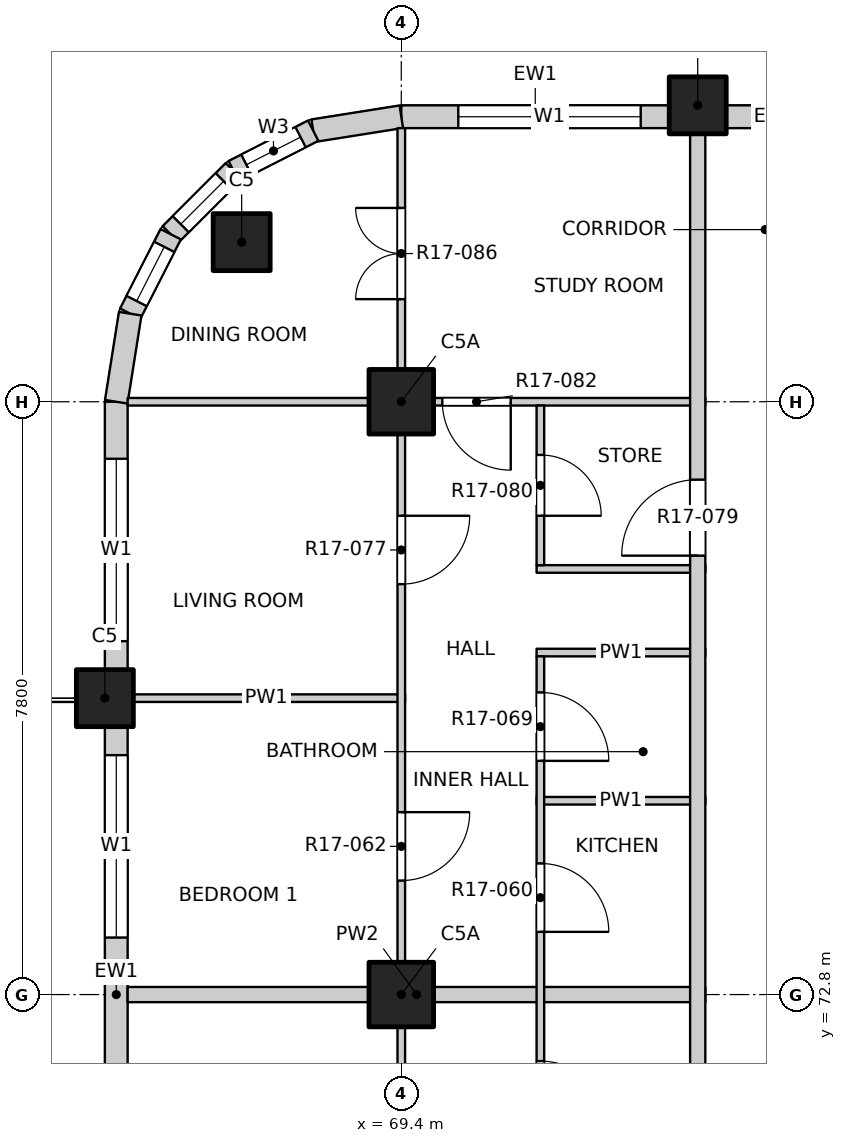
"""IFC4 building model, lengths in metres.
Left out: names, types, materials, properties, quantities, classifications, styles, units other than length and angle.
Written with IfcOpenShell. Run it as: python <this file> out.ifc"""

import sys

from ifc_helpers import new_model, si_unit, direction, frame, frame_2d, origin, origin_2d, place, context, subcontext, project, spatial, rectangle, extrude, element, fill, save


model = new_model("IFC4")
c1 = context("Model", 3, precision=1e-05, world=origin(), true_north=direction((0.0, 1.0)))
c2 = subcontext(c1, "Body", "Model", "MODEL_VIEW")
j1 = project(units=[si_unit("LENGTHUNIT", "METRE"), si_unit("PLANEANGLEUNIT", "RADIAN")], contexts=[c1])
p1 = place(None, origin())
s1 = spatial("IfcSite", under=j1, at=p1, CompositionType="ELEMENT")
p2 = place(p1, origin())
s2 = spatial("IfcBuilding", under=s1, at=p2, CompositionType="ELEMENT")
p3 = place(p2, frame((0.0, 0.0, 179.2)))
s3 = spatial("IfcBuildingStorey", under=s2, at=p3, CompositionType="ELEMENT", Elevation=179.2)
for number, where, z_axis, x_axis in (
    (1, (67.3, 82.7, -0.3), (0.0, 0.0, 1.0), (1.0, 0.0, 0.0)),
    (2, (73.3, 84.5, -0.3), (0.0, 0.0, 1.0), (1.0, 0.0, 0.0)),
    (3, (65.5, 76.7, -0.3), (0.0, 0.0, 1.0), (1.0, 0.0, 0.0)),
):
    element("IfcColumn", number, at=place(p3, frame(where, z_axis=z_axis, x_axis=x_axis)), inside=s3, PredefinedType="COLUMN", context=c2, shape_type="SweptSolid", body=[
        extrude(rectangle(XDim=0.75, YDim=0.75, at=origin_2d()), origin(), (0.0, 0.0, 1.0), 3.45),
    ])
for number, where, z_axis, x_axis in (
    (4, (69.4, 72.8, -0.3), (0.0, 0.0, 1.0), (1.0, 0.0, 0.0)),
    (5, (69.4, 80.6, -0.3), (0.0, 0.0, 1.0), (1.0, 0.0, 0.0)),
):
    element("IfcColumn", number, at=place(p3, frame(where, z_axis=z_axis, x_axis=x_axis)), inside=s3, PredefinedType="COLUMN", context=c2, shape_type="SweptSolid", body=[
        extrude(rectangle(XDim=0.85, YDim=0.85, at=origin_2d()), origin(), (0.0, 0.0, 1.0), 3.45),
    ])
p4 = place(p3, frame((69.4, 84.35, 0.0), z_axis=(0.0, 0.0, 1.0), x_axis=(1.0, 0.0, 0.0)))
e6 = element("IfcWall", 6, at=p4, inside=s3, PredefinedType="SOLIDWALL", context=c2, shape_type="SweptSolid", body=[
    extrude(rectangle(XDim=3.525, YDim=0.3, at=frame_2d((1.763, 0.0))), origin(), (0.0, 0.0, 1.0), 2.7),
])
p5 = place(p4, frame((0.75, 0.0, 0.9)))
e7 = element("IfcOpeningElement", 7, at=p5, cuts=e6, PredefinedType="OPENING", context=c2, shape_type="SweptSolid", body=[
    extrude(rectangle(XDim=2.4, YDim=1.8, at=frame_2d((1.2, 0.9))), frame((0.0, 0.16, 0.0), z_axis=(0.0, -1.0, 0.0), x_axis=(1.0, 0.0, 0.0)), (0.0, 0.0, 1.0), 0.32),
])
p6 = place(p3, frame((73.675, 84.35, 0.0), z_axis=(0.0, 0.0, 1.0), x_axis=(1.0, 0.0, 0.0)))
e8 = element("IfcWall", 8, at=p6, inside=s3, PredefinedType="SOLIDWALL", context=c2, shape_type="SweptSolid", body=[
    extrude(rectangle(XDim=1.3, YDim=0.3, at=frame_2d((0.65, 0.0))), origin(), (0.0, 0.0, 1.0), 2.7),
])
p7 = place(p3, frame((65.65, 69.275, 0.0), z_axis=(0.0, 0.0, 1.0), x_axis=(0.0, 1.0, 0.0)))
e9 = element("IfcWall", 9, at=p7, inside=s3, PredefinedType="SOLIDWALL", context=c2, shape_type="SweptSolid", body=[
    extrude(rectangle(XDim=7.05, YDim=0.3, at=frame_2d((3.525, 0.0))), origin(), (0.0, 0.0, 1.0), 2.7),
])
p8 = place(p7, frame((0.675, 0.0, 0.0)))
e10 = element("IfcOpeningElement", 10, at=p8, cuts=e9, PredefinedType="OPENING", context=c2, shape_type="SweptSolid", body=[
    extrude(rectangle(XDim=1.8, YDim=2.4, at=frame_2d((0.9, 1.2))), frame((0.0, 0.16, 0.0), z_axis=(0.0, -1.0, 0.0), x_axis=(1.0, 0.0, 0.0)), (0.0, 0.0, 1.0), 0.32),
])
p9 = place(p7, frame((4.275, 0.0, 0.9)))
e11 = element("IfcOpeningElement", 11, at=p9, cuts=e9, PredefinedType="OPENING", context=c2, shape_type="SweptSolid", body=[
    extrude(rectangle(XDim=2.4, YDim=1.8, at=frame_2d((1.2, 0.9))), frame((0.0, 0.16, 0.0), z_axis=(0.0, -1.0, 0.0), x_axis=(1.0, 0.0, 0.0)), (0.0, 0.0, 1.0), 0.32),
])
p10 = place(p3, frame((65.65, 77.075, 0.0), z_axis=(0.0, 0.0, 1.0), x_axis=(0.0, 1.0, 0.0)))
e12 = element("IfcWall", 12, at=p10, inside=s3, PredefinedType="SOLIDWALL", context=c2, shape_type="SweptSolid", body=[
    extrude(rectangle(XDim=3.525, YDim=0.3, at=frame_2d((1.763, 0.0))), origin(), (0.0, 0.0, 1.0), 2.7),
])
p11 = place(p10, frame((0.375, 0.0, 0.9)))
e13 = element("IfcOpeningElement", 13, at=p11, cuts=e12, PredefinedType="OPENING", context=c2, shape_type="SweptSolid", body=[
    extrude(rectangle(XDim=2.4, YDim=1.8, at=frame_2d((1.2, 0.9))), frame((0.0, 0.16, 0.0), z_axis=(0.0, -1.0, 0.0), x_axis=(1.0, 0.0, 0.0)), (0.0, 0.0, 1.0), 0.32),
])
p12 = place(p3, frame((69.4, 84.35, 0.0), z_axis=(0.0, 0.0, 1.0), x_axis=(-0.987678452879, -0.156496880861, 0.0)))
e14 = element("IfcWall", 14, at=p12, inside=s3, PredefinedType="SOLIDWALL", context=c2, shape_type="SweptSolid", body=[
    extrude(rectangle(XDim=1.173, YDim=0.3, at=frame_2d((0.586, 0.0))), origin(), (0.0, 0.0, 1.0), 2.7),
])
p13 = place(p3, frame((68.241, 84.167, 0.0), z_axis=(0.0, 0.0, 1.0), x_axis=(-0.890988677504, -0.454025524128, 0.0)))
e15 = element("IfcWall", 15, at=p13, inside=s3, PredefinedType="SOLIDWALL", context=c2, shape_type="SweptSolid", body=[
    extrude(rectangle(XDim=1.173, YDim=0.3, at=frame_2d((0.587, 0.0))), origin(), (0.0, 0.0, 1.0), 2.7),
])
p14 = place(p13, frame((0.187, 0.0, 0.9)))
e16 = element("IfcOpeningElement", 16, at=p14, cuts=e15, PredefinedType="OPENING", context=c2, shape_type="SweptSolid", body=[
    extrude(rectangle(XDim=0.8, YDim=1.2, at=frame_2d((0.4, 0.6))), frame((0.0, 0.16, 0.0), z_axis=(0.0, -1.0, 0.0), x_axis=(1.0, 0.0, 0.0)), (0.0, 0.0, 1.0), 0.32),
])
p15 = place(p3, frame((67.196, 83.634, 0.0), z_axis=(0.0, 0.0, 1.0), x_axis=(-0.707106781187, -0.707106781187, 0.0)))
e17 = element("IfcWall", 17, at=p15, inside=s3, PredefinedType="SOLIDWALL", context=c2, shape_type="SweptSolid", body=[
    extrude(rectangle(XDim=1.173, YDim=0.3, at=frame_2d((0.586, 0.0))), origin(), (0.0, 0.0, 1.0), 2.7),
])
p16 = place(p15, frame((0.187, 0.0, 0.9)))
e18 = element("IfcOpeningElement", 18, at=p16, cuts=e17, PredefinedType="OPENING", context=c2, shape_type="SweptSolid", body=[
    extrude(rectangle(XDim=0.8, YDim=1.2, at=frame_2d((0.4, 0.6))), frame((0.0, 0.16, 0.0), z_axis=(0.0, -1.0, 0.0), x_axis=(1.0, 0.0, 0.0)), (0.0, 0.0, 1.0), 0.32),
])
p17 = place(p3, frame((66.366, 82.804, 0.0), z_axis=(0.0, 0.0, 1.0), x_axis=(-0.454025524128, -0.890988677504, 0.0)))
e19 = element("IfcWall", 19, at=p17, inside=s3, PredefinedType="SOLIDWALL", context=c2, shape_type="SweptSolid", body=[
    extrude(rectangle(XDim=1.173, YDim=0.3, at=frame_2d((0.587, 0.0))), origin(), (0.0, 0.0, 1.0), 2.7),
])
p18 = place(p17, frame((0.187, 0.0, 0.9)))
e20 = element("IfcOpeningElement", 20, at=p18, cuts=e19, PredefinedType="OPENING", context=c2, shape_type="SweptSolid", body=[
    extrude(rectangle(XDim=0.8, YDim=1.2, at=frame_2d((0.4, 0.6))), frame((0.0, 0.16, 0.0), z_axis=(0.0, -1.0, 0.0), x_axis=(1.0, 0.0, 0.0)), (0.0, 0.0, 1.0), 0.32),
])
p19 = place(p3, frame((65.833, 81.759, 0.0), z_axis=(0.0, 0.0, 1.0), x_axis=(-0.156496880861, -0.987678452879, 0.0)))
e21 = element("IfcWall", 21, at=p19, inside=s3, PredefinedType="SOLIDWALL", context=c2, shape_type="SweptSolid", body=[
    extrude(rectangle(XDim=1.173, YDim=0.3, at=frame_2d((0.586, 0.0))), origin(), (0.0, 0.0, 1.0), 2.7),
])
p20 = place(p3, frame((65.8, 72.8, 0.0), z_axis=(0.0, 0.0, 1.0), x_axis=(1.0, 0.0, 0.0)))
e22 = element("IfcWall", 22, at=p20, inside=s3, PredefinedType="PARTITIONING", context=c2, shape_type="SweptSolid", body=[
    extrude(rectangle(XDim=7.6, YDim=0.2, at=frame_2d((3.8, 0.0))), origin(), (0.0, 0.0, 1.0), 3.15),
])
p21 = place(p3, frame((71.18, 75.35, 0.0), z_axis=(0.0, 0.0, 1.0), x_axis=(1.0, 0.0, 0.0)))
e23 = element("IfcWall", 23, at=p21, inside=s3, PredefinedType="PARTITIONING", context=c2, shape_type="SweptSolid", body=[
    extrude(rectangle(XDim=2.22, YDim=0.1, at=frame_2d((1.11, 0.0))), origin(), (0.0, 0.0, 1.0), 3.15),
])
p22 = place(p3, frame((65.8, 76.7, 0.0), z_axis=(0.0, 0.0, 1.0), x_axis=(1.0, 0.0, 0.0)))
e24 = element("IfcWall", 24, at=p22, inside=s3, PredefinedType="PARTITIONING", context=c2, shape_type="SweptSolid", body=[
    extrude(rectangle(XDim=3.65, YDim=0.1, at=frame_2d((1.825, 0.0))), origin(), (0.0, 0.0, 1.0), 2.55),
])
for number, where, z_axis, x_axis in (
    (25, (71.18, 77.3, 0.0), (0.0, 0.0, 1.0), (1.0, 0.0, 0.0)),
    (26, (71.18, 78.4, 0.0), (0.0, 0.0, 1.0), (1.0, 0.0, 0.0)),
):
    element("IfcWall", number, at=place(p3, frame(where, z_axis=z_axis, x_axis=x_axis)), inside=s3, PredefinedType="PARTITIONING", context=c2, shape_type="SweptSolid", body=[
        extrude(rectangle(XDim=2.22, YDim=0.1, at=frame_2d((1.11, 0.0))), origin(), (0.0, 0.0, 1.0), 3.15),
    ])
p23 = place(p3, frame((65.8, 80.6, 0.0), z_axis=(0.0, 0.0, 1.0), x_axis=(1.0, 0.0, 0.0)))
e27 = element("IfcWall", 27, at=p23, inside=s3, PredefinedType="PARTITIONING", context=c2, shape_type="SweptSolid", body=[
    extrude(rectangle(XDim=7.6, YDim=0.1, at=frame_2d((3.8, 0.0))), origin(), (0.0, 0.0, 1.0), 3.15),
])
p24 = place(p23, frame((4.14, 0.0, 0.0)))
e28 = element("IfcOpeningElement", 28, at=p24, cuts=e27, PredefinedType="OPENING", context=c2, shape_type="SweptSolid", body=[
    extrude(rectangle(XDim=0.9, YDim=2.1, at=frame_2d((0.45, 1.05))), frame((0.0, 0.06, 0.0), z_axis=(0.0, -1.0, 0.0), x_axis=(1.0, 0.0, 0.0)), (0.0, 0.0, 1.0), 0.12),
])
p25 = place(p3, frame((69.4, 45.8, 0.0), z_axis=(0.0, 0.0, 1.0), x_axis=(0.0, 1.0, 0.0)))
e29 = element("IfcWall", 29, at=p25, inside=s3, PredefinedType="PARTITIONING", context=c2, shape_type="SweptSolid", body=[
    extrude(rectangle(XDim=38.4, YDim=0.1, at=frame_2d((19.2, 0.0))), origin(), (0.0, 0.0, 1.0), 3.15),
])
p26 = place(p25, frame((1.05, 0.0, 0.0)))
e30 = element("IfcOpeningElement", 30, at=p26, cuts=e29, PredefinedType="OPENING", context=c2, shape_type="SweptSolid", body=[
    extrude(rectangle(XDim=1.2, YDim=2.1, at=frame_2d((0.6, 1.05))), frame((0.0, 0.06, 0.0), z_axis=(0.0, -1.0, 0.0), x_axis=(1.0, 0.0, 0.0)), (0.0, 0.0, 1.0), 0.12),
])
p27 = place(p25, frame((6.9, 0.0, 0.0)))
e31 = element("IfcOpeningElement", 31, at=p27, cuts=e29, PredefinedType="OPENING", context=c2, shape_type="SweptSolid", body=[
    extrude(rectangle(XDim=1.2, YDim=2.1, at=frame_2d((0.6, 1.05))), frame((0.0, 0.06, 0.0), z_axis=(0.0, -1.0, 0.0), x_axis=(1.0, 0.0, 0.0)), (0.0, 0.0, 1.0), 0.12),
])
p28 = place(p25, frame((12.9, 0.0, 0.0)))
e32 = element("IfcOpeningElement", 32, at=p28, cuts=e29, PredefinedType="OPENING", context=c2, shape_type="SweptSolid", body=[
    extrude(rectangle(XDim=0.9, YDim=2.1, at=frame_2d((0.45, 1.05))), frame((0.0, 0.06, 0.0), z_axis=(0.0, -1.0, 0.0), x_axis=(1.0, 0.0, 0.0)), (0.0, 0.0, 1.0), 0.12),
])
p29 = place(p25, frame((16.8, 0.0, 0.0)))
e33 = element("IfcOpeningElement", 33, at=p29, cuts=e29, PredefinedType="OPENING", context=c2, shape_type="SweptSolid", body=[
    extrude(rectangle(XDim=0.9, YDim=2.1, at=frame_2d((0.45, 1.05))), frame((0.0, 0.06, 0.0), z_axis=(0.0, -1.0, 0.0), x_axis=(1.0, 0.0, 0.0)), (0.0, 0.0, 1.0), 0.12),
])
p30 = place(p25, frame((20.7, 0.0, 0.0)))
e34 = element("IfcOpeningElement", 34, at=p30, cuts=e29, PredefinedType="OPENING", context=c2, shape_type="SweptSolid", body=[
    extrude(rectangle(XDim=0.9, YDim=2.1, at=frame_2d((0.45, 1.05))), frame((0.0, 0.06, 0.0), z_axis=(0.0, -1.0, 0.0), x_axis=(1.0, 0.0, 0.0)), (0.0, 0.0, 1.0), 0.12),
])
p31 = place(p25, frame((24.6, 0.0, 0.0)))
e35 = element("IfcOpeningElement", 35, at=p31, cuts=e29, PredefinedType="OPENING", context=c2, shape_type="SweptSolid", body=[
    extrude(rectangle(XDim=0.9, YDim=2.1, at=frame_2d((0.45, 1.05))), frame((0.0, 0.06, 0.0), z_axis=(0.0, -1.0, 0.0), x_axis=(1.0, 0.0, 0.0)), (0.0, 0.0, 1.0), 0.12),
])
p32 = place(p25, frame((28.5, 0.0, 0.0)))
e36 = element("IfcOpeningElement", 36, at=p32, cuts=e29, PredefinedType="OPENING", context=c2, shape_type="SweptSolid", body=[
    extrude(rectangle(XDim=0.9, YDim=2.1, at=frame_2d((0.45, 1.05))), frame((0.0, 0.06, 0.0), z_axis=(0.0, -1.0, 0.0), x_axis=(1.0, 0.0, 0.0)), (0.0, 0.0, 1.0), 0.12),
])
p33 = place(p25, frame((32.4, 0.0, 0.0)))
e37 = element("IfcOpeningElement", 37, at=p33, cuts=e29, PredefinedType="OPENING", context=c2, shape_type="SweptSolid", body=[
    extrude(rectangle(XDim=0.9, YDim=2.1, at=frame_2d((0.45, 1.05))), frame((0.0, 0.06, 0.0), z_axis=(0.0, -1.0, 0.0), x_axis=(1.0, 0.0, 0.0)), (0.0, 0.0, 1.0), 0.12),
])
p34 = place(p25, frame((36.15, 0.0, 0.0)))
e38 = element("IfcOpeningElement", 38, at=p34, cuts=e29, PredefinedType="OPENING", context=c2, shape_type="SweptSolid", body=[
    extrude(rectangle(XDim=1.2, YDim=2.1, at=frame_2d((0.6, 1.05))), frame((0.0, 0.06, 0.0), z_axis=(0.0, -1.0, 0.0), x_axis=(1.0, 0.0, 0.0)), (0.0, 0.0, 1.0), 0.12),
])
p35 = place(p3, frame((71.23, 68.2, 0.0), z_axis=(0.0, 0.0, 1.0), x_axis=(0.0, 1.0, 0.0)))
e39 = element("IfcWall", 39, at=p35, inside=s3, PredefinedType="PARTITIONING", context=c2, shape_type="SweptSolid", body=[
    extrude(rectangle(XDim=9.05, YDim=0.1, at=frame_2d((4.525, 0.0))), origin(), (0.0, 0.0, 1.0), 3.15),
])
p36 = place(p35, frame((0.55, 0.0, 0.0)))
e40 = element("IfcOpeningElement", 40, at=p36, cuts=e39, PredefinedType="OPENING", context=c2, shape_type="SweptSolid", body=[
    extrude(rectangle(XDim=0.8, YDim=2.1, at=frame_2d((0.4, 1.05))), frame((0.0, 0.06, 0.0), z_axis=(0.0, -1.0, 0.0), x_axis=(1.0, 0.0, 0.0)), (0.0, 0.0, 1.0), 0.12),
])
p37 = place(p35, frame((2.825, 0.0, 0.0)))
e41 = element("IfcOpeningElement", 41, at=p37, cuts=e39, PredefinedType="OPENING", context=c2, shape_type="SweptSolid", body=[
    extrude(rectangle(XDim=0.9, YDim=2.1, at=frame_2d((0.45, 1.05))), frame((0.0, 0.06, 0.0), z_axis=(0.0, -1.0, 0.0), x_axis=(1.0, 0.0, 0.0)), (0.0, 0.0, 1.0), 0.12),
])
p38 = place(p35, frame((5.425, 0.0, 0.0)))
e42 = element("IfcOpeningElement", 42, at=p38, cuts=e39, PredefinedType="OPENING", context=c2, shape_type="SweptSolid", body=[
    extrude(rectangle(XDim=0.9, YDim=2.1, at=frame_2d((0.45, 1.05))), frame((0.0, 0.06, 0.0), z_axis=(0.0, -1.0, 0.0), x_axis=(1.0, 0.0, 0.0)), (0.0, 0.0, 1.0), 0.12),
])
p39 = place(p35, frame((7.675, 0.0, 0.0)))
e43 = element("IfcOpeningElement", 43, at=p39, cuts=e39, PredefinedType="OPENING", context=c2, shape_type="SweptSolid", body=[
    extrude(rectangle(XDim=0.9, YDim=2.1, at=frame_2d((0.45, 1.05))), frame((0.0, 0.06, 0.0), z_axis=(0.0, -1.0, 0.0), x_axis=(1.0, 0.0, 0.0)), (0.0, 0.0, 1.0), 0.12),
])
p40 = place(p3, frame((71.23, 78.45, 0.0), z_axis=(0.0, 0.0, 1.0), x_axis=(0.0, 1.0, 0.0)))
e44 = element("IfcWall", 44, at=p40, inside=s3, PredefinedType="PARTITIONING", context=c2, shape_type="SweptSolid", body=[
    extrude(rectangle(XDim=2.1, YDim=0.1, at=frame_2d((1.05, 0.0))), origin(), (0.0, 0.0, 1.0), 3.15),
])
p41 = place(p40, frame((0.65, 0.0, 0.0)))
e45 = element("IfcOpeningElement", 45, at=p41, cuts=e44, PredefinedType="OPENING", context=c2, shape_type="SweptSolid", body=[
    extrude(rectangle(XDim=0.8, YDim=2.1, at=frame_2d((0.4, 1.05))), frame((0.0, 0.06, 0.0), z_axis=(0.0, -1.0, 0.0), x_axis=(1.0, 0.0, 0.0)), (0.0, 0.0, 1.0), 0.12),
])
p42 = place(p3, frame((73.3, 49.5, 0.0), z_axis=(0.0, 0.0, 1.0), x_axis=(0.0, 1.0, 0.0)))
e46 = element("IfcWall", 46, at=p42, inside=s3, PredefinedType="PARTITIONING", context=c2, shape_type="SweptSolid", body=[
    extrude(rectangle(XDim=34.7, YDim=0.2, at=frame_2d((17.35, 0.0))), origin(), (0.0, 0.0, 1.0), 3.15),
])
p43 = place(p42, frame((10.575, 0.0, 0.0)))
e47 = element("IfcOpeningElement", 47, at=p43, cuts=e46, PredefinedType="OPENING", context=c2, shape_type="SweptSolid", body=[
    extrude(rectangle(XDim=1.0, YDim=2.1, at=frame_2d((0.5, 1.05))), frame((0.0, 0.11, 0.0), z_axis=(0.0, -1.0, 0.0), x_axis=(1.0, 0.0, 0.0)), (0.0, 0.0, 1.0), 0.22),
])
p44 = place(p42, frame((18.825, 0.0, 0.0)))
e48 = element("IfcOpeningElement", 48, at=p44, cuts=e46, PredefinedType="OPENING", context=c2, shape_type="SweptSolid", body=[
    extrude(rectangle(XDim=1.0, YDim=2.1, at=frame_2d((0.5, 1.05))), frame((0.0, 0.11, 0.0), z_axis=(0.0, -1.0, 0.0), x_axis=(1.0, 0.0, 0.0)), (0.0, 0.0, 1.0), 0.22),
])
p45 = place(p42, frame((29.075, 0.0, 0.0)))
e49 = element("IfcOpeningElement", 49, at=p45, cuts=e46, PredefinedType="OPENING", context=c2, shape_type="SweptSolid", body=[
    extrude(rectangle(XDim=1.0, YDim=2.1, at=frame_2d((0.5, 1.05))), frame((0.0, 0.11, 0.0), z_axis=(0.0, -1.0, 0.0), x_axis=(1.0, 0.0, 0.0)), (0.0, 0.0, 1.0), 0.22),
])
p46 = place(p5, origin())
e50 = element("IfcWindow", 50, at=p46, inside=s3, PartitioningType="DOUBLE_PANEL_VERTICAL", PredefinedType="WINDOW", context=c2, shape_type="SweptSolid", body=[
    extrude(rectangle(XDim=2.4, YDim=1.8, at=frame_2d((1.2, 0.9))), frame((0.0, 0.03, 0.0), z_axis=(0.0, -1.0, 0.0), x_axis=(1.0, 0.0, 0.0)), (0.0, 0.0, 1.0), 0.06),
])
fill(e7, e50)
p47 = place(p9, origin())
e51 = element("IfcWindow", 51, at=p47, inside=s3, PartitioningType="DOUBLE_PANEL_VERTICAL", PredefinedType="WINDOW", context=c2, shape_type="SweptSolid", body=[
    extrude(rectangle(XDim=2.4, YDim=1.8, at=frame_2d((1.2, 0.9))), frame((0.0, 0.03, 0.0), z_axis=(0.0, -1.0, 0.0), x_axis=(1.0, 0.0, 0.0)), (0.0, 0.0, 1.0), 0.06),
])
fill(e11, e51)
p48 = place(p11, origin())
e52 = element("IfcWindow", 52, at=p48, inside=s3, PartitioningType="DOUBLE_PANEL_VERTICAL", PredefinedType="WINDOW", context=c2, shape_type="SweptSolid", body=[
    extrude(rectangle(XDim=2.4, YDim=1.8, at=frame_2d((1.2, 0.9))), frame((0.0, 0.03, 0.0), z_axis=(0.0, -1.0, 0.0), x_axis=(1.0, 0.0, 0.0)), (0.0, 0.0, 1.0), 0.06),
])
fill(e13, e52)
p49 = place(p14, origin())
e53 = element("IfcWindow", 53, at=p49, inside=s3, PartitioningType="SINGLE_PANEL", PredefinedType="WINDOW", context=c2, shape_type="SweptSolid", body=[
    extrude(rectangle(XDim=0.8, YDim=1.2, at=frame_2d((0.4, 0.6))), frame((0.0, 0.03, 0.0), z_axis=(0.0, -1.0, 0.0), x_axis=(1.0, 0.0, 0.0)), (0.0, 0.0, 1.0), 0.06),
])
fill(e16, e53)
p50 = place(p16, origin())
e54 = element("IfcWindow", 54, at=p50, inside=s3, PartitioningType="SINGLE_PANEL", PredefinedType="WINDOW", context=c2, shape_type="SweptSolid", body=[
    extrude(rectangle(XDim=0.8, YDim=1.2, at=frame_2d((0.4, 0.6))), frame((0.0, 0.03, 0.0), z_axis=(0.0, -1.0, 0.0), x_axis=(1.0, 0.0, 0.0)), (0.0, 0.0, 1.0), 0.06),
])
fill(e18, e54)
p51 = place(p18, origin())
e55 = element("IfcWindow", 55, at=p51, inside=s3, PartitioningType="SINGLE_PANEL", PredefinedType="WINDOW", context=c2, shape_type="SweptSolid", body=[
    extrude(rectangle(XDim=0.8, YDim=1.2, at=frame_2d((0.4, 0.6))), frame((0.0, 0.03, 0.0), z_axis=(0.0, -1.0, 0.0), x_axis=(1.0, 0.0, 0.0)), (0.0, 0.0, 1.0), 0.06),
])
fill(e20, e55)
p52 = place(p37, origin())
e56 = element("IfcDoor", 56, at=p52, inside=s3, OperationType="SINGLE_SWING_RIGHT", PredefinedType="DOOR", context=c2, shape_type="SweptSolid", body=[
    extrude(rectangle(XDim=0.9, YDim=2.1, at=frame_2d((0.45, 1.05))), frame((0.0, 0.025, 0.0), z_axis=(0.0, -1.0, 0.0), x_axis=(1.0, 0.0, 0.0)), (0.0, 0.0, 1.0), 0.05),
])
fill(e41, e56)
p53 = place(p38, origin())
e57 = element("IfcDoor", 57, at=p53, inside=s3, OperationType="SINGLE_SWING_RIGHT", PredefinedType="DOOR", context=c2, shape_type="SweptSolid", body=[
    extrude(rectangle(XDim=0.9, YDim=2.1, at=frame_2d((0.45, 1.05))), frame((0.0, 0.025, 0.0), z_axis=(0.0, -1.0, 0.0), x_axis=(1.0, 0.0, 0.0)), (0.0, 0.0, 1.0), 0.05),
])
fill(e42, e57)
p54 = place(p32, origin())
e58 = element("IfcDoor", 58, at=p54, inside=s3, OperationType="SINGLE_SWING_LEFT", PredefinedType="DOOR", context=c2, shape_type="SweptSolid", body=[
    extrude(rectangle(XDim=0.9, YDim=2.1, at=frame_2d((0.45, 1.05))), frame((0.0, 0.025, 0.0), z_axis=(0.0, -1.0, 0.0), x_axis=(1.0, 0.0, 0.0)), (0.0, 0.0, 1.0), 0.05),
])
fill(e36, e58)
p55 = place(p39, origin())
e59 = element("IfcDoor", 59, at=p55, inside=s3, OperationType="SINGLE_SWING_RIGHT", PredefinedType="DOOR", context=c2, shape_type="SweptSolid", body=[
    extrude(rectangle(XDim=0.9, YDim=2.1, at=frame_2d((0.45, 1.05))), frame((0.0, 0.025, 0.0), z_axis=(0.0, -1.0, 0.0), x_axis=(1.0, 0.0, 0.0)), (0.0, 0.0, 1.0), 0.05),
])
fill(e43, e59)
p56 = place(p33, origin())
e60 = element("IfcDoor", 60, at=p56, inside=s3, OperationType="SINGLE_SWING_LEFT", PredefinedType="DOOR", context=c2, shape_type="SweptSolid", body=[
    extrude(rectangle(XDim=0.9, YDim=2.1, at=frame_2d((0.45, 1.05))), frame((0.0, 0.025, 0.0), z_axis=(0.0, -1.0, 0.0), x_axis=(1.0, 0.0, 0.0)), (0.0, 0.0, 1.0), 0.05),
])
fill(e37, e60)
p57 = place(p45, origin())
e61 = element("IfcDoor", 61, at=p57, inside=s3, OperationType="SINGLE_SWING_RIGHT", PredefinedType="DOOR", context=c2, shape_type="SweptSolid", body=[
    extrude(rectangle(XDim=1.0, YDim=2.1, at=frame_2d((0.5, 1.05))), frame((0.0, 0.025, 0.0), z_axis=(0.0, -1.0, 0.0), x_axis=(1.0, 0.0, 0.0)), (0.0, 0.0, 1.0), 0.05),
])
fill(e49, e61)
p58 = place(p41, origin())
e62 = element("IfcDoor", 62, at=p58, inside=s3, OperationType="SINGLE_SWING_RIGHT", PredefinedType="DOOR", context=c2, shape_type="SweptSolid", body=[
    extrude(rectangle(XDim=0.8, YDim=2.1, at=frame_2d((0.4, 1.05))), frame((0.0, 0.025, 0.0), z_axis=(0.0, -1.0, 0.0), x_axis=(1.0, 0.0, 0.0)), (0.0, 0.0, 1.0), 0.05),
])
fill(e45, e62)
p59 = place(p24, origin())
e63 = element("IfcDoor", 63, at=p59, inside=s3, OperationType="SINGLE_SWING_LEFT", PredefinedType="DOOR", context=c2, shape_type="SweptSolid", body=[
    extrude(rectangle(XDim=0.9, YDim=2.1, at=frame_2d((0.45, 1.05))), frame((0.0, 0.025, 0.0), z_axis=(0.0, -1.0, 0.0), x_axis=(1.0, 0.0, 0.0)), (0.0, 0.0, 1.0), 0.05),
])
fill(e28, e63)
p60 = place(p34, origin())
e64 = element("IfcDoor", 64, at=p60, inside=s3, OperationType="DOUBLE_DOOR_SINGLE_SWING", PredefinedType="DOOR", context=c2, shape_type="SweptSolid", body=[
    extrude(rectangle(XDim=1.2, YDim=2.1, at=frame_2d((0.6, 1.05))), frame((0.0, 0.025, 0.0), z_axis=(0.0, -1.0, 0.0), x_axis=(1.0, 0.0, 0.0)), (0.0, 0.0, 1.0), 0.05),
])
fill(e38, e64)
save(model, sys.argv[1])
